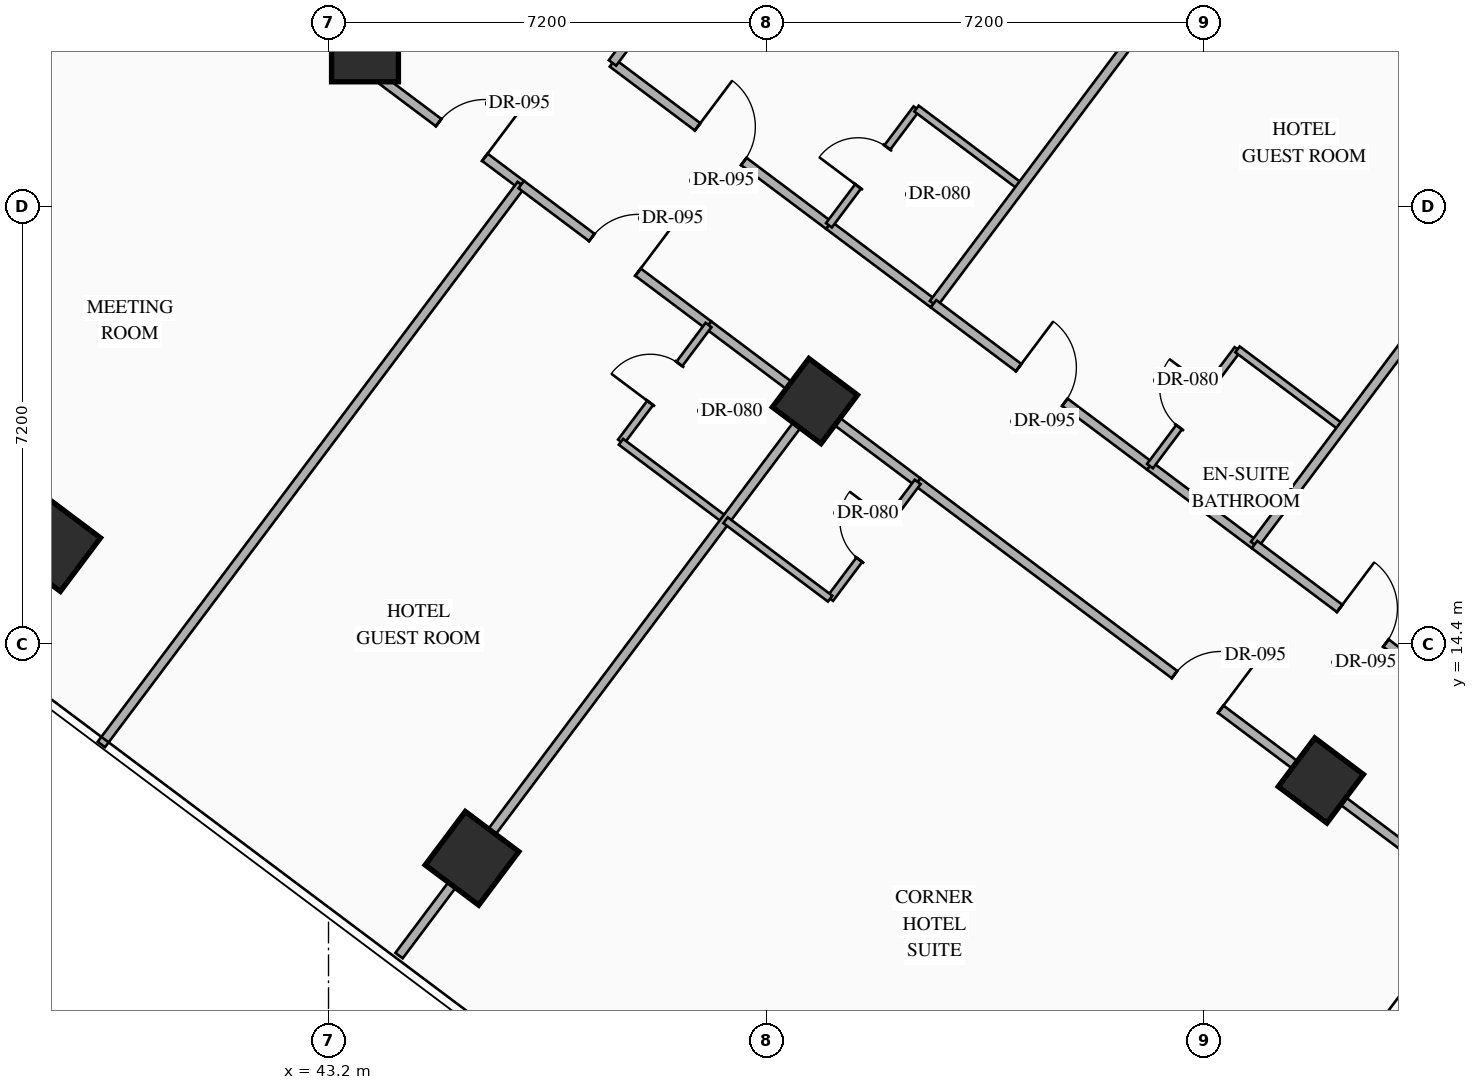
"""IFC4 building model, lengths in metres.
Left out: names, types, materials, properties, quantities, classifications, styles, units other than length and angle.
Written with IfcOpenShell. Run it as: python <this file> out.ifc"""

import sys

from ifc_helpers import new_model, si_unit, direction, frame, frame_2d, origin, origin_2d, place, context, subcontext, project, spatial, rectangle, hollow_rectangle, extrude, element, fill, save


model = new_model("IFC4")
c1 = context("Model", 3, precision=1e-05, world=origin(), true_north=direction((0.0, 1.0)))
c2 = subcontext(c1, "Body", "Model", "MODEL_VIEW")
j1 = project(units=[si_unit("LENGTHUNIT", "METRE"), si_unit("PLANEANGLEUNIT", "RADIAN")], contexts=[c1])
p1 = place(None, origin())
s1 = spatial("IfcSite", under=j1, at=p1, CompositionType="ELEMENT")
p2 = place(p1, origin())
s2 = spatial("IfcBuilding", under=s1, at=p2, CompositionType="ELEMENT")
p3 = place(p2, frame((0.0, 0.0, 66.75)))
s3 = spatial("IfcBuildingStorey", under=s2, at=p3, CompositionType="ELEMENT", Elevation=66.75)
p4 = place(p3, frame((43.8, 24.2, 0.0), z_axis=(0.0, 0.0, 1.0), x_axis=(1.0, 0.0, 0.0)))
e1 = element("IfcColumn", 1, at=p4, inside=s3, PredefinedType="COLUMN", context=c2, shape_type="SweptSolid", body=[
    extrude(rectangle(XDim=1.1, YDim=1.1, at=origin_2d()), origin(), (0.0, 0.0, 1.0), 3.35),
])
for number, where, z_axis, x_axis in (
    (2, (38.68, 16.04, 0.0), (0.0, 0.0, 1.0), (0.8, -0.6, 0.0)),
    (3, (45.56, 10.88, 0.0), (0.0, 0.0, 1.0), (0.8, -0.6, 0.0)),
):
    element("IfcColumn", number, at=place(p3, frame(where, z_axis=z_axis, x_axis=x_axis)), inside=s3, PredefinedType="COLUMN", context=c2, shape_type="SweptSolid", body=[
        extrude(hollow_rectangle(XDim=1.1, YDim=1.1, WallThickness=0.04, at=origin_2d()), origin(), (0.0, 0.0, 1.0), 3.35),
    ])
for number, where, z_axis, x_axis in (
    (4, (51.2, 18.4, 0.0), (0.0, 0.0, 1.0), (0.8, -0.6, 0.0)),
    (5, (59.52, 12.16, 0.0), (0.0, 0.0, 1.0), (0.8, -0.6, 0.0)),
):
    element("IfcColumn", number, at=place(p3, frame(where, z_axis=z_axis, x_axis=x_axis)), inside=s3, PredefinedType="COLUMN", context=c2, shape_type="SweptSolid", body=[
        extrude(hollow_rectangle(XDim=1.0, YDim=1.0, WallThickness=0.038, at=origin_2d()), origin(), (0.0, 0.0, 1.0), 3.35),
    ])
p5 = place(p3, frame((44.86, 40.73, 0.0), z_axis=(0.0, 0.0, 1.0), x_axis=(0.800006902154, -0.599990797017, 0.0)))
e6 = element("IfcWall", 6, at=p5, inside=s3, PredefinedType="STANDARD", context=c2, shape_type="SweptSolid", body=[
    extrude(rectangle(XDim=29.712, YDim=0.28, at=frame_2d((14.856, 0.0))), origin(), (0.0, 0.0, 1.0), 3.09),
])
p6 = place(p5, frame((14.249, 0.0, 0.0)))
e7 = element("IfcOpeningElement", 7, at=p6, cuts=e6, PredefinedType="OPENING", context=c2, shape_type="SweptSolid", body=[
    extrude(rectangle(XDim=1.1, YDim=2.2, at=frame_2d((0.55, 1.1))), frame((0.0, 0.15, 0.0), z_axis=(0.0, -1.0, 0.0), x_axis=(1.0, 0.0, 0.0)), (0.0, 0.0, 1.0), 0.3),
])
p7 = place(p5, frame((1.612, 0.0, 0.85)))
e8 = element("IfcOpeningElement", 8, at=p7, cuts=e6, PredefinedType="OPENING", context=c2, shape_type="SweptSolid", body=[
    extrude(rectangle(XDim=1.4, YDim=1.8, at=frame_2d((0.7, 0.9))), frame((0.0, 0.15, 0.0), z_axis=(0.0, -1.0, 0.0), x_axis=(1.0, 0.0, 0.0)), (0.0, 0.0, 1.0), 0.3),
])
p8 = place(p5, frame((5.667, 0.0, 0.85)))
e9 = element("IfcOpeningElement", 9, at=p8, cuts=e6, PredefinedType="OPENING", context=c2, shape_type="SweptSolid", body=[
    extrude(rectangle(XDim=1.4, YDim=1.8, at=frame_2d((0.7, 0.9))), frame((0.0, 0.15, 0.0), z_axis=(0.0, -1.0, 0.0), x_axis=(1.0, 0.0, 0.0)), (0.0, 0.0, 1.0), 0.3),
])
p9 = place(p5, frame((9.912, 0.0, 0.85)))
e10 = element("IfcOpeningElement", 10, at=p9, cuts=e6, PredefinedType="OPENING", context=c2, shape_type="SweptSolid", body=[
    extrude(rectangle(XDim=1.4, YDim=1.8, at=frame_2d((0.7, 0.9))), frame((0.0, 0.15, 0.0), z_axis=(0.0, -1.0, 0.0), x_axis=(1.0, 0.0, 0.0)), (0.0, 0.0, 1.0), 0.3),
])
p10 = place(p5, frame((19.743, 0.0, 0.85)))
e11 = element("IfcOpeningElement", 11, at=p10, cuts=e6, PredefinedType="OPENING", context=c2, shape_type="SweptSolid", body=[
    extrude(rectangle(XDim=1.4, YDim=1.8, at=frame_2d((0.7, 0.9))), frame((0.0, 0.15, 0.0), z_axis=(0.0, -1.0, 0.0), x_axis=(1.0, 0.0, 0.0)), (0.0, 0.0, 1.0), 0.3),
])
p11 = place(p5, frame((22.645, 0.0, 0.85)))
e12 = element("IfcOpeningElement", 12, at=p11, cuts=e6, PredefinedType="OPENING", context=c2, shape_type="SweptSolid", body=[
    extrude(rectangle(XDim=1.4, YDim=1.8, at=frame_2d((0.7, 0.9))), frame((0.0, 0.15, 0.0), z_axis=(0.0, -1.0, 0.0), x_axis=(1.0, 0.0, 0.0)), (0.0, 0.0, 1.0), 0.3),
])
p12 = place(p5, frame((26.7, 0.0, 0.85)))
e13 = element("IfcOpeningElement", 13, at=p12, cuts=e6, PredefinedType="OPENING", context=c2, shape_type="SweptSolid", body=[
    extrude(rectangle(XDim=1.4, YDim=1.8, at=frame_2d((0.7, 0.9))), frame((0.0, 0.15, 0.0), z_axis=(0.0, -1.0, 0.0), x_axis=(1.0, 0.0, 0.0)), (0.0, 0.0, 1.0), 0.3),
])
p13 = place(p3, frame((43.037, 24.46, 0.0), z_axis=(0.0, 0.0, 1.0), x_axis=(0.799971872363, -0.600037501685, 0.0)))
e14 = element("IfcWall", 14, at=p13, inside=s3, PredefinedType="PARTITIONING", context=c2, shape_type="SweptSolid", body=[
    extrude(rectangle(XDim=4.167, YDim=0.15, at=frame_2d((2.083, 0.0))), origin(), (0.0, 0.0, 1.0), 2.425),
])
p14 = place(p13, frame((2.468, 0.0, 0.0)))
e15 = element("IfcOpeningElement", 15, at=p14, cuts=e14, PredefinedType="OPENING", context=c2, shape_type="SweptSolid", body=[
    extrude(rectangle(XDim=0.95, YDim=2.15, at=frame_2d((0.475, 1.075))), frame((0.0, 0.085, 0.0), z_axis=(0.0, -1.0, 0.0), x_axis=(1.0, 0.0, 0.0)), (0.0, 0.0, 1.0), 0.17),
])
p15 = place(p3, frame((33.384, 17.312, 0.0), z_axis=(0.0, 0.0, 1.0), x_axis=(0.600008743659, 0.799993442181, 0.0)))
e16 = element("IfcWall", 16, at=p15, inside=s3, PredefinedType="PARTITIONING", context=c2, shape_type="SweptSolid", body=[
    extrude(rectangle(XDim=8.935, YDim=0.15, at=frame_2d((4.468, 0.0))), origin(), (0.0, 0.0, 1.0), 3.09),
])
p16 = place(p3, frame((39.464, 12.752, 0.0), z_axis=(0.0, 0.0, 1.0), x_axis=(0.6, 0.8, 0.0)))
e17 = element("IfcWall", 17, at=p16, inside=s3, PredefinedType="PARTITIONING", context=c2, shape_type="SweptSolid", body=[
    extrude(rectangle(XDim=11.51, YDim=0.15, at=frame_2d((5.755, 0.0))), origin(), (0.0, 0.0, 1.0), 3.09),
])
p17 = place(p3, frame((47.87, 23.96, 0.0), z_axis=(0.0, 0.0, 1.0), x_axis=(0.799993416095, -0.600008778439, 0.0)))
e18 = element("IfcWall", 18, at=p17, inside=s3, PredefinedType="PARTITIONING", context=c2, shape_type="SweptSolid", body=[
    extrude(rectangle(XDim=4.45, YDim=0.15, at=frame_2d((2.225, 0.0))), origin(), (0.0, 0.0, 1.0), 2.775),
])
p18 = place(p17, frame((1.75, 0.0, 0.0)))
e19 = element("IfcOpeningElement", 19, at=p18, cuts=e18, PredefinedType="OPENING", context=c2, shape_type="SweptSolid", body=[
    extrude(rectangle(XDim=0.95, YDim=2.15, at=frame_2d((0.475, 1.075))), frame((0.0, 0.085, 0.0), z_axis=(0.0, -1.0, 0.0), x_axis=(1.0, 0.0, 0.0)), (0.0, 0.0, 1.0), 0.17),
])
p19 = place(p3, frame((51.43, 21.29, 0.0), z_axis=(0.0, 0.0, 1.0), x_axis=(0.79998637334, -0.60001816845, 0.0)))
e20 = element("IfcWall", 20, at=p19, inside=s3, PredefinedType="PARTITIONING", context=c2, shape_type="SweptSolid", body=[
    extrude(rectangle(XDim=2.15, YDim=0.15, at=frame_2d((1.075, 0.0))), origin(), (0.0, 0.0, 1.0), 2.775),
])
p20 = place(p3, frame((51.43, 21.29, 0.0), z_axis=(0.0, 0.0, 1.0), x_axis=(0.600065100855, 0.79995117022, 0.0)))
e21 = element("IfcWall", 21, at=p20, inside=s3, PredefinedType="PARTITIONING", context=c2, shape_type="SweptSolid", body=[
    extrude(rectangle(XDim=2.4, YDim=0.12, at=frame_2d((1.2, 0.0))), origin(), (0.0, 0.0, 1.0), 3.09),
])
p21 = place(p20, frame((0.8, 0.0, 0.0)))
e22 = element("IfcOpeningElement", 22, at=p21, cuts=e21, PredefinedType="OPENING", context=c2, shape_type="SweptSolid", body=[
    extrude(rectangle(XDim=0.8, YDim=2.06, at=frame_2d((0.4, 1.03))), frame((0.0, 0.07, 0.0), z_axis=(0.0, -1.0, 0.0), x_axis=(1.0, 0.0, 0.0)), (0.0, 0.0, 1.0), 0.14),
])
p22 = place(p3, frame((52.87, 23.21, 0.0), z_axis=(0.0, 0.0, 1.0), x_axis=(0.79998637334, -0.60001816845, 0.0)))
e23 = element("IfcWall", 23, at=p22, inside=s3, PredefinedType="PARTITIONING", context=c2, shape_type="SweptSolid", body=[
    extrude(rectangle(XDim=2.15, YDim=0.12, at=frame_2d((1.075, 0.0))), origin(), (0.0, 0.0, 1.0), 3.09),
])
for number, where, z_axis, x_axis in (
    (24, (47.87, 23.96, 0.0), (0.0, 0.0, 1.0), (0.6, 0.8, 0.0)),
    (25, (53.15, 20.0, 0.0), (0.0, 0.0, 1.0), (0.6, 0.8, 0.0)),
):
    element("IfcWall", number, at=place(p3, frame(where, z_axis=z_axis, x_axis=x_axis)), inside=s3, PredefinedType="PARTITIONING", context=c2, shape_type="SweptSolid", body=[
        extrude(rectangle(XDim=11.55, YDim=0.15, at=frame_2d((5.775, 0.0))), origin(), (0.0, 0.0, 1.0), 3.09),
    ])
p23 = place(p3, frame((53.15, 20.0, 0.0), z_axis=(0.0, 0.0, 1.0), x_axis=(0.800013166942, -0.599982443676, 0.0)))
e26 = element("IfcWall", 26, at=p23, inside=s3, PredefinedType="PARTITIONING", context=c2, shape_type="SweptSolid", body=[
    extrude(rectangle(XDim=4.45, YDim=0.15, at=frame_2d((2.225, 0.0))), origin(), (0.0, 0.0, 1.0), 2.775),
])
p24 = place(p23, frame((1.75, 0.0, 0.0)))
e27 = element("IfcOpeningElement", 27, at=p24, cuts=e26, PredefinedType="OPENING", context=c2, shape_type="SweptSolid", body=[
    extrude(rectangle(XDim=0.95, YDim=2.15, at=frame_2d((0.475, 1.075))), frame((0.0, 0.085, 0.0), z_axis=(0.0, -1.0, 0.0), x_axis=(1.0, 0.0, 0.0)), (0.0, 0.0, 1.0), 0.17),
])
p25 = place(p3, frame((56.71, 17.33, 0.0), z_axis=(0.0, 0.0, 1.0), x_axis=(0.79998637334, -0.60001816845, 0.0)))
e28 = element("IfcWall", 28, at=p25, inside=s3, PredefinedType="PARTITIONING", context=c2, shape_type="SweptSolid", body=[
    extrude(rectangle(XDim=2.15, YDim=0.15, at=frame_2d((1.075, 0.0))), origin(), (0.0, 0.0, 1.0), 2.775),
])
p26 = place(p3, frame((56.71, 17.33, 0.0), z_axis=(0.0, 0.0, 1.0), x_axis=(0.6, 0.8, 0.0)))
e29 = element("IfcWall", 29, at=p26, inside=s3, PredefinedType="PARTITIONING", context=c2, shape_type="SweptSolid", body=[
    extrude(rectangle(XDim=2.4, YDim=0.12, at=frame_2d((1.2, 0.0))), origin(), (0.0, 0.0, 1.0), 3.09),
])
p27 = place(p26, frame((0.8, 0.0, 0.0)))
e30 = element("IfcOpeningElement", 30, at=p27, cuts=e29, PredefinedType="OPENING", context=c2, shape_type="SweptSolid", body=[
    extrude(rectangle(XDim=0.8, YDim=2.06, at=frame_2d((0.4, 1.03))), frame((0.0, 0.07, 0.0), z_axis=(0.0, -1.0, 0.0), x_axis=(1.0, 0.0, 0.0)), (0.0, 0.0, 1.0), 0.14),
])
p28 = place(p3, frame((58.15, 19.25, 0.0), z_axis=(0.0, 0.0, 1.0), x_axis=(0.800027249606, -0.599963665473, 0.0)))
e31 = element("IfcWall", 31, at=p28, inside=s3, PredefinedType="PARTITIONING", context=c2, shape_type="SweptSolid", body=[
    extrude(rectangle(XDim=2.15, YDim=0.12, at=frame_2d((1.075, 0.0))), origin(), (0.0, 0.0, 1.0), 3.09),
])
p29 = place(p3, frame((58.43, 16.04, 0.0), z_axis=(0.0, 0.0, 1.0), x_axis=(0.60001014597, 0.799992390422, 0.0)))
e32 = element("IfcWall", 32, at=p29, inside=s3, PredefinedType="PARTITIONING", context=c2, shape_type="SweptSolid", body=[
    extrude(rectangle(XDim=11.55, YDim=0.15, at=frame_2d((5.775, 0.0))), origin(), (0.0, 0.0, 1.0), 3.09),
])
p30 = place(p3, frame((58.43, 16.04, 0.0), z_axis=(0.0, 0.0, 1.0), x_axis=(0.800013166942, -0.599982443676, 0.0)))
e33 = element("IfcWall", 33, at=p30, inside=s3, PredefinedType="PARTITIONING", context=c2, shape_type="SweptSolid", body=[
    extrude(rectangle(XDim=4.45, YDim=0.15, at=frame_2d((2.225, 0.0))), origin(), (0.0, 0.0, 1.0), 2.775),
])
p31 = place(p30, frame((1.75, 0.0, 0.0)))
e34 = element("IfcOpeningElement", 34, at=p31, cuts=e33, PredefinedType="OPENING", context=c2, shape_type="SweptSolid", body=[
    extrude(rectangle(XDim=0.95, YDim=2.15, at=frame_2d((0.475, 1.075))), frame((0.0, 0.085, 0.0), z_axis=(0.0, -1.0, 0.0), x_axis=(1.0, 0.0, 0.0)), (0.0, 0.0, 1.0), 0.17),
])
p32 = place(p3, frame((46.37, 21.96, 0.0), z_axis=(0.0, 0.0, 1.0), x_axis=(0.799977170108, -0.600030438649, 0.0)))
e35 = element("IfcWall", 35, at=p32, inside=s3, PredefinedType="PARTITIONING", context=c2, shape_type="SweptSolid", body=[
    extrude(rectangle(XDim=3.85, YDim=0.15, at=frame_2d((1.925, 0.0))), origin(), (0.0, 0.0, 1.0), 2.425),
])
p33 = place(p32, frame((1.45, 0.0, 0.0)))
e36 = element("IfcOpeningElement", 36, at=p33, cuts=e35, PredefinedType="OPENING", context=c2, shape_type="SweptSolid", body=[
    extrude(rectangle(XDim=0.95, YDim=2.15, at=frame_2d((0.475, 1.075))), frame((0.0, 0.085, 0.0), z_axis=(0.0, -1.0, 0.0), x_axis=(1.0, 0.0, 0.0)), (0.0, 0.0, 1.0), 0.17),
])
p34 = place(p3, frame((49.45, 19.65, 0.0), z_axis=(0.0, 0.0, 1.0), x_axis=(0.800040880289, -0.59994548908, 0.0)))
e37 = element("IfcWall", 37, at=p34, inside=s3, PredefinedType="PARTITIONING", context=c2, shape_type="SweptSolid", body=[
    extrude(rectangle(XDim=2.15, YDim=0.15, at=frame_2d((1.075, 0.0))), origin(), (0.0, 0.0, 1.0), 2.425),
])
p35 = place(p3, frame((48.01, 17.73, 0.0), z_axis=(0.0, 0.0, 1.0), x_axis=(0.6, 0.8, 0.0)))
e38 = element("IfcWall", 38, at=p35, inside=s3, PredefinedType="PARTITIONING", context=c2, shape_type="SweptSolid", body=[
    extrude(rectangle(XDim=2.4, YDim=0.12, at=frame_2d((1.2, 0.0))), origin(), (0.0, 0.0, 1.0), 3.09),
])
p36 = place(p35, frame((0.8, 0.0, 0.0)))
e39 = element("IfcOpeningElement", 39, at=p36, cuts=e38, PredefinedType="OPENING", context=c2, shape_type="SweptSolid", body=[
    extrude(rectangle(XDim=0.8, YDim=2.06, at=frame_2d((0.4, 1.03))), frame((0.0, 0.07, 0.0), z_axis=(0.0, -1.0, 0.0), x_axis=(1.0, 0.0, 0.0)), (0.0, 0.0, 1.0), 0.14),
])
p37 = place(p3, frame((48.01, 17.73, 0.0), z_axis=(0.0, 0.0, 1.0), x_axis=(0.79998637334, -0.60001816845, 0.0)))
e40 = element("IfcWall", 40, at=p37, inside=s3, PredefinedType="PARTITIONING", context=c2, shape_type="SweptSolid", body=[
    extrude(rectangle(XDim=2.15, YDim=0.12, at=frame_2d((1.075, 0.0))), origin(), (0.0, 0.0, 1.0), 3.09),
])
p38 = place(p3, frame((44.36, 9.28, 0.0), z_axis=(0.0, 0.0, 1.0), x_axis=(0.599986233332, 0.800010324816, 0.0)))
e41 = element("IfcWall", 41, at=p38, inside=s3, PredefinedType="PARTITIONING", context=c2, shape_type="SweptSolid", body=[
    extrude(rectangle(XDim=11.35, YDim=0.15, at=frame_2d((5.675, 0.0))), origin(), (0.0, 0.0, 1.0), 2.425),
])
p39 = place(p3, frame((51.17, 18.36, 0.0), z_axis=(0.0, 0.0, 1.0), x_axis=(0.79998637334, -0.60001816845, 0.0)))
e42 = element("IfcWall", 42, at=p39, inside=s3, PredefinedType="PARTITIONING", context=c2, shape_type="SweptSolid", body=[
    extrude(rectangle(XDim=2.15, YDim=0.15, at=frame_2d((1.075, 0.0))), origin(), (0.0, 0.0, 1.0), 2.425),
])
p40 = place(p3, frame((52.89, 17.07, 0.0), z_axis=(0.0, 0.0, 1.0), x_axis=(0.8, -0.6, 0.0)))
e43 = element("IfcWall", 43, at=p40, inside=s3, PredefinedType="PARTITIONING", context=c2, shape_type="SweptSolid", body=[
    extrude(rectangle(XDim=11.51, YDim=0.15, at=frame_2d((5.755, 0.0))), origin(), (0.0, 0.0, 1.0), 2.425),
])
p41 = place(p40, frame((5.28, 0.0, 0.0)))
e44 = element("IfcOpeningElement", 44, at=p41, cuts=e43, PredefinedType="OPENING", context=c2, shape_type="SweptSolid", body=[
    extrude(rectangle(XDim=0.95, YDim=2.15, at=frame_2d((0.475, 1.075))), frame((0.0, 0.085, 0.0), z_axis=(0.0, -1.0, 0.0), x_axis=(1.0, 0.0, 0.0)), (0.0, 0.0, 1.0), 0.17),
])
p42 = place(p3, frame((51.45, 15.15, 0.0), z_axis=(0.0, 0.0, 1.0), x_axis=(0.599951172744, 0.800036618114, 0.0)))
e45 = element("IfcWall", 45, at=p42, inside=s3, PredefinedType="PARTITIONING", context=c2, shape_type="SweptSolid", body=[
    extrude(rectangle(XDim=2.4, YDim=0.12, at=frame_2d((1.2, 0.0))), origin(), (0.0, 0.0, 1.0), 3.09),
])
p43 = place(p42, frame((0.8, 0.0, 0.0)))
e46 = element("IfcOpeningElement", 46, at=p43, cuts=e45, PredefinedType="OPENING", context=c2, shape_type="SweptSolid", body=[
    extrude(rectangle(XDim=0.8, YDim=2.06, at=frame_2d((0.4, 1.03))), frame((0.0, 0.07, 0.0), z_axis=(0.0, -1.0, 0.0), x_axis=(1.0, 0.0, 0.0)), (0.0, 0.0, 1.0), 0.14),
])
p44 = place(p3, frame((49.73, 16.44, 0.0), z_axis=(0.0, 0.0, 1.0), x_axis=(0.79998637334, -0.60001816845, 0.0)))
e47 = element("IfcWall", 47, at=p44, inside=s3, PredefinedType="PARTITIONING", context=c2, shape_type="SweptSolid", body=[
    extrude(rectangle(XDim=2.15, YDim=0.12, at=frame_2d((1.075, 0.0))), origin(), (0.0, 0.0, 1.0), 3.09),
])
p45 = place(p14, origin())
e48 = element("IfcDoor", 48, at=p45, inside=s3, OperationType="SINGLE_SWING_RIGHT", PredefinedType="DOOR", context=c2, shape_type="SweptSolid", body=[
    extrude(rectangle(XDim=0.95, YDim=2.15, at=frame_2d((0.475, 1.075))), frame((0.0, 0.025, 0.0), z_axis=(0.0, -1.0, 0.0), x_axis=(1.0, 0.0, 0.0)), (0.0, 0.0, 1.0), 0.05),
])
fill(e15, e48)
p46 = place(p18, origin())
e49 = element("IfcDoor", 49, at=p46, inside=s3, OperationType="SINGLE_SWING_LEFT", PredefinedType="DOOR", context=c2, shape_type="SweptSolid", body=[
    extrude(rectangle(XDim=0.95, YDim=2.15, at=frame_2d((0.475, 1.075))), frame((0.0, 0.025, 0.0), z_axis=(0.0, -1.0, 0.0), x_axis=(1.0, 0.0, 0.0)), (0.0, 0.0, 1.0), 0.05),
])
fill(e19, e49)
p47 = place(p21, origin())
e50 = element("IfcDoor", 50, at=p47, inside=s3, OperationType="SINGLE_SWING_LEFT", PredefinedType="DOOR", context=c2, shape_type="SweptSolid", body=[
    extrude(rectangle(XDim=0.8, YDim=2.06, at=frame_2d((0.4, 1.03))), frame((0.0, 0.025, 0.0), z_axis=(0.0, -1.0, 0.0), x_axis=(1.0, 0.0, 0.0)), (0.0, 0.0, 1.0), 0.05),
])
fill(e22, e50)
p48 = place(p24, origin())
e51 = element("IfcDoor", 51, at=p48, inside=s3, OperationType="SINGLE_SWING_LEFT", PredefinedType="DOOR", context=c2, shape_type="SweptSolid", body=[
    extrude(rectangle(XDim=0.95, YDim=2.15, at=frame_2d((0.475, 1.075))), frame((0.0, 0.025, 0.0), z_axis=(0.0, -1.0, 0.0), x_axis=(1.0, 0.0, 0.0)), (0.0, 0.0, 1.0), 0.05),
])
fill(e27, e51)
p49 = place(p27, origin())
e52 = element("IfcDoor", 52, at=p49, inside=s3, OperationType="SINGLE_SWING_RIGHT", PredefinedType="DOOR", context=c2, shape_type="SweptSolid", body=[
    extrude(rectangle(XDim=0.8, YDim=2.06, at=frame_2d((0.4, 1.03))), frame((0.0, 0.025, 0.0), z_axis=(0.0, -1.0, 0.0), x_axis=(1.0, 0.0, 0.0)), (0.0, 0.0, 1.0), 0.05),
])
fill(e30, e52)
p50 = place(p31, origin())
e53 = element("IfcDoor", 53, at=p50, inside=s3, OperationType="SINGLE_SWING_LEFT", PredefinedType="DOOR", context=c2, shape_type="SweptSolid", body=[
    extrude(rectangle(XDim=0.95, YDim=2.15, at=frame_2d((0.475, 1.075))), frame((0.0, 0.025, 0.0), z_axis=(0.0, -1.0, 0.0), x_axis=(1.0, 0.0, 0.0)), (0.0, 0.0, 1.0), 0.05),
])
fill(e34, e53)
p51 = place(p33, origin())
e54 = element("IfcDoor", 54, at=p51, inside=s3, OperationType="SINGLE_SWING_RIGHT", PredefinedType="DOOR", context=c2, shape_type="SweptSolid", body=[
    extrude(rectangle(XDim=0.95, YDim=2.15, at=frame_2d((0.475, 1.075))), frame((0.0, 0.025, 0.0), z_axis=(0.0, -1.0, 0.0), x_axis=(1.0, 0.0, 0.0)), (0.0, 0.0, 1.0), 0.05),
])
fill(e36, e54)
p52 = place(p36, origin())
e55 = element("IfcDoor", 55, at=p52, inside=s3, OperationType="SINGLE_SWING_LEFT", PredefinedType="DOOR", context=c2, shape_type="SweptSolid", body=[
    extrude(rectangle(XDim=0.8, YDim=2.06, at=frame_2d((0.4, 1.03))), frame((0.0, 0.025, 0.0), z_axis=(0.0, -1.0, 0.0), x_axis=(1.0, 0.0, 0.0)), (0.0, 0.0, 1.0), 0.05),
])
fill(e39, e55)
p53 = place(p41, origin())
e56 = element("IfcDoor", 56, at=p53, inside=s3, OperationType="SINGLE_SWING_RIGHT", PredefinedType="DOOR", context=c2, shape_type="SweptSolid", body=[
    extrude(rectangle(XDim=0.95, YDim=2.15, at=frame_2d((0.475, 1.075))), frame((0.0, 0.025, 0.0), z_axis=(0.0, -1.0, 0.0), x_axis=(1.0, 0.0, 0.0)), (0.0, 0.0, 1.0), 0.05),
])
fill(e44, e56)
p54 = place(p43, origin())
e57 = element("IfcDoor", 57, at=p54, inside=s3, OperationType="SINGLE_SWING_RIGHT", PredefinedType="DOOR", context=c2, shape_type="SweptSolid", body=[
    extrude(rectangle(XDim=0.8, YDim=2.06, at=frame_2d((0.4, 1.03))), frame((0.0, 0.025, 0.0), z_axis=(0.0, -1.0, 0.0), x_axis=(1.0, 0.0, 0.0)), (0.0, 0.0, 1.0), 0.05),
])
fill(e46, e57)
save(model, sys.argv[1])
